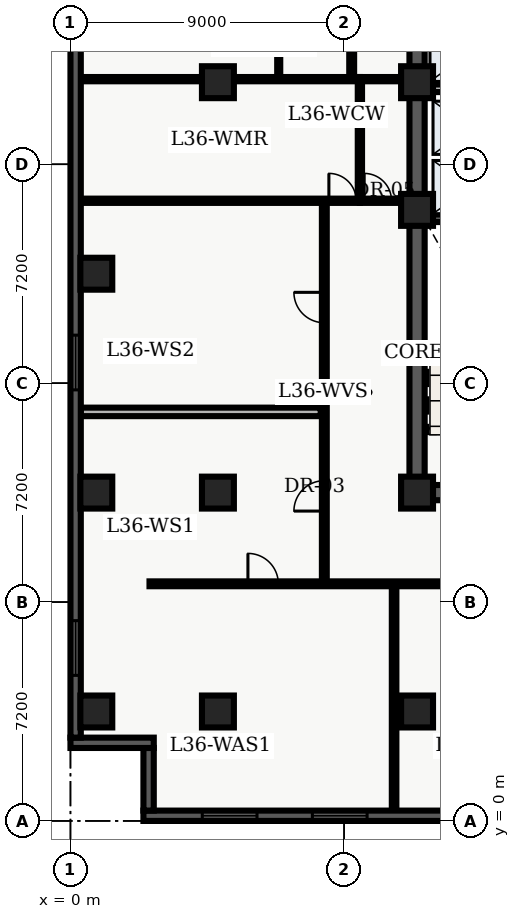
"""IFC4 building model, lengths in metres.
Left out: names, types, materials, properties, quantities, classifications, styles, units other than length and angle.
Written with IfcOpenShell. Run it as: python <this file> out.ifc"""

import sys

from ifc_helpers import new_model, entity, si_unit, converted_unit, direction, frame, origin_with_axes, origin_2d_with_axis, place, context, subcontext, project, spatial, polyline, rectangle, outline, extrude, element, fill, save


model = new_model("IFC4")
c1 = context("Model", 3, precision=1e-05, world=origin_with_axes(), true_north=direction((0.0, 1.0)))
c2 = subcontext(c1, "Body", "Model", "MODEL_VIEW")
j1 = project(units=[si_unit("LENGTHUNIT", "METRE"), converted_unit("PLANEANGLEUNIT", "DEGREE", entity("IfcPlaneAngleMeasure", 0.017), si_unit("PLANEANGLEUNIT", "RADIAN"), dimensions=[0, 0, 0, 0, 0, 0, 0])], contexts=[c1])
p1 = place(None, origin_with_axes())
s1 = spatial("IfcSite", under=j1, at=p1, CompositionType="ELEMENT")
p2 = place(p1, origin_with_axes())
s2 = spatial("IfcBuilding", under=s1, at=p2, CompositionType="ELEMENT")
p3 = place(p2, frame((0.0, 0.0, 148.5), z_axis=(0.0, 0.0, 1.0), x_axis=(1.0, 0.0, 0.0)))
s3 = spatial("IfcBuildingStorey", under=s2, at=p3, CompositionType="ELEMENT", Elevation=148.5)
p4 = place(p3, frame((11.4, 10.8, 0.0), z_axis=(0.0, 0.0, 1.0), x_axis=(0.0, 1.0, 0.0)))
e1 = element("IfcWall", 1, at=p4, inside=s3, PredefinedType="SHEAR", context=c2, shape_type="SweptSolid", body=[
    extrude(outline(polyline([(0.0, -0.25), (27.0, -0.25), (27.0, 0.25), (0.0, 0.25), (0.0, -0.25)])), origin_with_axes(), (0.0, 0.0, 1.0), 3.66),
])
p5 = place(p3, frame((11.4, 10.8, 0.0), z_axis=(0.0, 0.0, 1.0), x_axis=(1.0, 0.0, 0.0)))
e2 = element("IfcWall", 2, at=p5, inside=s3, PredefinedType="SHEAR", context=c2, shape_type="SweptSolid", body=[
    extrude(outline(polyline([(0.0, -0.25), (7.2, -0.25), (7.2, 0.25), (0.0, 0.25), (0.0, -0.25)])), origin_with_axes(), (0.0, 0.0, 1.0), 3.66),
])
p6 = place(p5, frame((2.625, 0.0, 0.0), z_axis=(0.0, 0.0, 1.0), x_axis=(1.0, 0.0, 0.0)))
e3 = element("IfcOpeningElement", 3, at=p6, cuts=e2, PredefinedType="OPENING", context=c2, shape_type="SweptSolid", body=[
    extrude(rectangle(XDim=1.05, YDim=0.52, at=origin_2d_with_axis()), origin_with_axes(), (0.0, 0.0, 1.0), 2.15),
])
p7 = place(p3, frame((11.65, 19.825, 0.0), z_axis=(0.0, 0.0, 1.0), x_axis=(1.0, 0.0, 0.0)))
e4 = element("IfcWall", 4, at=p7, inside=s3, PredefinedType="SHEAR", context=c2, shape_type="SweptSolid", body=[
    extrude(outline(polyline([(0.0, -0.125), (6.7, -0.125), (6.7, 0.125), (0.0, 0.125), (0.0, -0.125)])), origin_with_axes(), (0.0, 0.0, 1.0), 3.66),
])
p8 = place(p3, frame((11.7, 24.1, 0.0), z_axis=(0.0, 0.0, 1.0), x_axis=(1.0, 0.0, 0.0)))
e5 = element("IfcWall", 5, at=p8, inside=s3, PredefinedType="SOLIDWALL", context=c2, shape_type="SweptSolid", body=[
    extrude(outline(polyline([(0.0, -0.125), (6.6, -0.125), (6.6, 0.125), (0.0, 0.125), (0.0, -0.125)])), origin_with_axes(), (0.0, 0.0, 1.0), 2.7),
])
p9 = place(p8, frame((3.75, 0.0, 0.0), z_axis=(0.0, 0.0, 1.0), x_axis=(1.0, 0.0, 0.0)))
e6 = element("IfcOpeningElement", 6, at=p9, cuts=e5, PredefinedType="OPENING", context=c2, shape_type="SweptSolid", body=[
    extrude(rectangle(XDim=0.9, YDim=0.27, at=origin_2d_with_axis()), origin_with_axes(), (0.0, 0.0, 1.0), 2.15),
])
for number, where, z_axis, x_axis in (
    (7, (11.4, 3.6, 0.0), (0.0, 0.0, 1.0), (1.0, 0.0, 0.0)),
    (8, (11.4, 10.8, 0.0), (0.0, 0.0, 1.0), (1.0, 0.0, 0.0)),
    (9, (11.4, 20.1, 0.0), (0.0, 0.0, 1.0), (1.0, 0.0, 0.0)),
    (10, (11.4, 24.3, 0.0), (0.0, 0.0, 1.0), (1.0, 0.0, 0.0)),
    (11, (4.85, 3.6, 0.0), (0.0, 0.0, 1.0), (1.0, 0.0, 0.0)),
    (12, (4.85, 10.8, 0.0), (0.0, 0.0, 1.0), (1.0, 0.0, 0.0)),
    (13, (4.85, 24.3, 0.0), (0.0, 0.0, 1.0), (1.0, 0.0, 0.0)),
    (14, (0.85, 3.6, 0.0), (0.0, 0.0, 1.0), (1.0, 0.0, 0.0)),
    (15, (0.85, 10.8, 0.0), (0.0, 0.0, 1.0), (1.0, 0.0, 0.0)),
    (16, (0.85, 18.0, 0.0), (0.0, 0.0, 1.0), (1.0, 0.0, 0.0)),
):
    element("IfcColumn", number, at=place(p3, frame(where, z_axis=z_axis, x_axis=x_axis)), inside=s3, PredefinedType="COLUMN", context=c2, shape_type="SweptSolid", body=[
        extrude(rectangle(XDim=1.05, YDim=1.05, at=origin_2d_with_axis()), origin_with_axes(), (0.0, 0.0, 1.0), 3.9),
    ])
p10 = place(p3, frame((9.52, 20.4, 0.0), z_axis=(0.0, 0.0, 1.0), x_axis=(0.0, 1.0, 0.0)))
e17 = element("IfcWall", 17, at=p10, inside=s3, PredefinedType="PARTITIONING", context=c2, shape_type="SweptSolid", body=[
    extrude(outline(polyline([(0.0, -0.07), (4.0, -0.07), (4.0, 0.07), (0.0, 0.07), (0.0, -0.07)])), origin_with_axes(), (0.0, 0.0, 1.0), 2.7),
])
p11 = place(p3, frame((9.52, 20.4, 0.0), z_axis=(0.0, 0.0, 1.0), x_axis=(1.0, 0.0, 0.0)))
e18 = element("IfcWall", 18, at=p11, inside=s3, PredefinedType="PARTITIONING", context=c2, shape_type="SweptSolid", body=[
    extrude(outline(polyline([(0.0, -0.07), (1.58, -0.07), (1.58, 0.07), (0.0, 0.07), (0.0, -0.07)])), origin_with_axes(), (0.0, 0.0, 1.0), 2.7),
])
p12 = place(p11, frame((0.59, 0.0, 0.0), z_axis=(0.0, 0.0, 1.0), x_axis=(1.0, 0.0, 0.0)))
e19 = element("IfcOpeningElement", 19, at=p12, cuts=e18, PredefinedType="OPENING", context=c2, shape_type="SweptSolid", body=[
    extrude(rectangle(XDim=0.9, YDim=0.16, at=origin_2d_with_axis()), origin_with_axes(), (0.0, 0.0, 1.0), 2.15),
])
p13 = place(p3, frame((9.52, 24.4, 0.0), z_axis=(0.0, 0.0, 1.0), x_axis=(1.0, 0.0, 0.0)))
e20 = element("IfcWall", 20, at=p13, inside=s3, PredefinedType="PARTITIONING", context=c2, shape_type="SweptSolid", body=[
    extrude(outline(polyline([(0.0, -0.07), (1.58, -0.07), (1.58, 0.07), (0.0, 0.07), (0.0, -0.07)])), origin_with_axes(), (0.0, 0.0, 1.0), 2.7),
])
p14 = place(p3, frame((2.6, 7.8, 0.0), z_axis=(0.0, 0.0, 1.0), x_axis=(1.0, 0.0, 0.0)))
e21 = element("IfcWall", 21, at=p14, inside=s3, PredefinedType="PARTITIONING", context=c2, shape_type="SweptSolid", body=[
    extrude(outline(polyline([(0.0, -0.08), (18.55, -0.08), (18.55, 0.08), (0.0, 0.08), (0.0, -0.08)])), origin_with_axes(), (0.0, 0.0, 1.0), 2.7),
])
p15 = place(p14, frame((3.737, 0.0, 0.0), z_axis=(0.0, 0.0, 1.0), x_axis=(1.0, 0.0, 0.0)))
e22 = element("IfcOpeningElement", 22, at=p15, cuts=e21, PredefinedType="OPENING", context=c2, shape_type="SweptSolid", body=[
    extrude(rectangle(XDim=1.0, YDim=0.18, at=origin_2d_with_axis()), origin_with_axes(), (0.0, 0.0, 1.0), 2.15),
])
p16 = place(p14, frame((13.273, 0.0, 0.0), z_axis=(0.0, 0.0, 1.0), x_axis=(1.0, 0.0, 0.0)))
e23 = element("IfcOpeningElement", 23, at=p16, cuts=e21, PredefinedType="OPENING", context=c2, shape_type="SweptSolid", body=[
    extrude(rectangle(XDim=1.0, YDim=0.18, at=origin_2d_with_axis()), origin_with_axes(), (0.0, 0.0, 1.0), 2.15),
])
p17 = place(p3, frame((8.35, 7.8, 0.0), z_axis=(0.0, 0.0, 1.0), x_axis=(0.0, 1.0, 0.0)))
e24 = element("IfcWall", 24, at=p17, inside=s3, PredefinedType="PARTITIONING", context=c2, shape_type="SweptSolid", body=[
    extrude(outline(polyline([(0.0, -0.08), (12.6, -0.08), (12.6, 0.08), (0.0, 0.08), (0.0, -0.08)])), origin_with_axes(), (0.0, 0.0, 1.0), 2.7),
])
p18 = place(p17, frame((2.893, 0.0, 0.0), z_axis=(0.0, 0.0, 1.0), x_axis=(1.0, 0.0, 0.0)))
e25 = element("IfcOpeningElement", 25, at=p18, cuts=e24, PredefinedType="OPENING", context=c2, shape_type="SweptSolid", body=[
    extrude(rectangle(XDim=1.0, YDim=0.18, at=origin_2d_with_axis()), origin_with_axes(), (0.0, 0.0, 1.0), 2.15),
])
p19 = place(p17, frame((9.088, 0.0, 0.0), z_axis=(0.0, 0.0, 1.0), x_axis=(1.0, 0.0, 0.0)))
e26 = element("IfcOpeningElement", 26, at=p19, cuts=e24, PredefinedType="OPENING", context=c2, shape_type="SweptSolid", body=[
    extrude(rectangle(XDim=1.0, YDim=0.18, at=origin_2d_with_axis()), origin_with_axes(), (0.0, 0.0, 1.0), 2.15),
])
p20 = place(p3, frame((9.25, 24.4, 0.0), z_axis=(0.0, 0.0, 1.0), x_axis=(0.0, 1.0, 0.0)))
e27 = element("IfcWall", 27, at=p20, inside=s3, PredefinedType="PARTITIONING", context=c2, shape_type="SweptSolid", body=[
    extrude(outline(polyline([(0.0, -0.08), (16.1, -0.08), (16.1, 0.08), (0.0, 0.08), (0.0, -0.08)])), origin_with_axes(), (0.0, 0.0, 1.0), 2.7),
])
p21 = place(p20, frame((3.567, 0.0, 0.0), z_axis=(0.0, 0.0, 1.0), x_axis=(1.0, 0.0, 0.0)))
e28 = element("IfcOpeningElement", 28, at=p21, cuts=e27, PredefinedType="OPENING", context=c2, shape_type="SweptSolid", body=[
    extrude(rectangle(XDim=1.0, YDim=0.18, at=origin_2d_with_axis()), origin_with_axes(), (0.0, 0.0, 1.0), 2.15),
])
p22 = place(p20, frame((11.512, 0.0, 0.0), z_axis=(0.0, 0.0, 1.0), x_axis=(1.0, 0.0, 0.0)))
e29 = element("IfcOpeningElement", 29, at=p22, cuts=e27, PredefinedType="OPENING", context=c2, shape_type="SweptSolid", body=[
    extrude(rectangle(XDim=1.0, YDim=0.18, at=origin_2d_with_axis()), origin_with_axes(), (0.0, 0.0, 1.0), 2.15),
])
p23 = place(p3, frame((0.335, 20.4, 0.0), z_axis=(0.0, 0.0, 1.0), x_axis=(1.0, 0.0, 0.0)))
e30 = element("IfcWall", 30, at=p23, inside=s3, PredefinedType="PARTITIONING", context=c2, shape_type="SweptSolid", body=[
    extrude(outline(polyline([(0.0, -0.07), (9.185, -0.07), (9.185, 0.07), (0.0, 0.07), (0.0, -0.07)])), origin_with_axes(), (0.0, 0.0, 1.0), 2.7),
])
p24 = place(p23, frame((8.615, 0.0, 0.0), z_axis=(0.0, 0.0, 1.0), x_axis=(1.0, 0.0, 0.0)))
e31 = element("IfcOpeningElement", 31, at=p24, cuts=e30, PredefinedType="OPENING", context=c2, shape_type="SweptSolid", body=[
    extrude(rectangle(XDim=0.9, YDim=0.16, at=origin_2d_with_axis()), origin_with_axes(), (0.0, 0.0, 1.0), 2.15),
])
p25 = place(p3, frame((0.335, 24.4, 0.0), z_axis=(0.0, 0.0, 1.0), x_axis=(1.0, 0.0, 0.0)))
e32 = element("IfcWall", 32, at=p25, inside=s3, PredefinedType="PARTITIONING", context=c2, shape_type="SweptSolid", body=[
    extrude(outline(polyline([(0.0, -0.07), (9.185, -0.07), (9.185, 0.07), (0.0, 0.07), (0.0, -0.07)])), origin_with_axes(), (0.0, 0.0, 1.0), 2.7),
])
p26 = place(p3, frame((0.335, 13.455, 0.0), z_axis=(0.0, 0.0, 1.0), x_axis=(1.0, 0.0, 0.0)))
e33 = element("IfcWall", 33, at=p26, inside=s3, PredefinedType="PARTITIONING", context=c2, shape_type="SweptSolid", body=[
    extrude(outline(polyline([(0.0, -0.14), (7.895, -0.14), (7.895, 0.14), (0.0, 0.14), (0.0, -0.14)])), origin_with_axes(), (0.0, 0.0, 1.0), 2.7),
])
p27 = place(p3, frame((6.85, 24.55, 0.0), z_axis=(0.0, 0.0, 1.0), x_axis=(0.0, 1.0, 0.0)))
e34 = element("IfcWall", 34, at=p27, inside=s3, PredefinedType="PARTITIONING", context=c2, shape_type="SweptSolid", body=[
    extrude(outline(polyline([(0.0, -0.05), (15.75, -0.05), (15.75, 0.05), (0.0, 0.05), (0.0, -0.05)])), origin_with_axes(), (0.0, 0.0, 1.0), 2.7),
])
p28 = place(p27, frame((3.417, 0.0, 0.0), z_axis=(0.0, 0.0, 1.0), x_axis=(1.0, 0.0, 0.0)))
e35 = element("IfcOpeningElement", 35, at=p28, cuts=e34, PredefinedType="OPENING", context=c2, shape_type="SweptSolid", body=[
    extrude(rectangle(XDim=0.95, YDim=0.12, at=origin_2d_with_axis()), origin_with_axes(), (0.0, 0.0, 1.0), 2.15),
])
p29 = place(p27, frame((11.082, 0.0, 0.0), z_axis=(0.0, 0.0, 1.0), x_axis=(1.0, 0.0, 0.0)))
e36 = element("IfcOpeningElement", 36, at=p29, cuts=e34, PredefinedType="OPENING", context=c2, shape_type="SweptSolid", body=[
    extrude(rectangle(XDim=0.95, YDim=0.12, at=origin_2d_with_axis()), origin_with_axes(), (0.0, 0.0, 1.0), 2.15),
])
p30 = place(p3, frame((10.645, 0.335, 0.0), z_axis=(0.0, 0.0, 1.0), x_axis=(0.0, 1.0, 0.0)))
e37 = element("IfcWall", 37, at=p30, inside=s3, PredefinedType="PARTITIONING", context=c2, shape_type="SweptSolid", body=[
    extrude(outline(polyline([(0.0, -0.075), (7.365, -0.075), (7.365, 0.075), (0.0, 0.075), (0.0, -0.075)])), origin_with_axes(), (0.0, 0.0, 1.0), 2.7),
])
p31 = place(p3, frame((57.26, 0.17, 0.0), z_axis=(0.0, 0.0, 1.0), x_axis=(-1.0, 0.0, 0.0)))
e38 = element("IfcWall", 38, at=p31, inside=s3, PredefinedType="SOLIDWALL", context=c2, shape_type="SweptSolid", body=[
    extrude(outline(polyline([(0.0, -0.17), (54.86, -0.17), (54.86, 0.17), (0.0, 0.17), (0.0, -0.17)])), origin_with_axes(), (0.0, 0.0, 1.0), 3.66),
])
p32 = place(p31, frame((2.836, 0.0, 0.45), z_axis=(0.0, 0.0, 1.0), x_axis=(1.0, 0.0, 0.0)))
e39 = element("IfcOpeningElement", 39, at=p32, cuts=e38, PredefinedType="OPENING", context=c2, shape_type="SweptSolid", body=[
    extrude(rectangle(XDim=1.8, YDim=0.36, at=origin_2d_with_axis()), origin_with_axes(), (0.0, 0.0, 1.0), 2.1),
])
p33 = place(p31, frame((7.307, 0.0, 0.45), z_axis=(0.0, 0.0, 1.0), x_axis=(1.0, 0.0, 0.0)))
e40 = element("IfcOpeningElement", 40, at=p33, cuts=e38, PredefinedType="OPENING", context=c2, shape_type="SweptSolid", body=[
    extrude(rectangle(XDim=1.8, YDim=0.36, at=origin_2d_with_axis()), origin_with_axes(), (0.0, 0.0, 1.0), 2.1),
])
p34 = place(p31, frame((11.779, 0.0, 0.45), z_axis=(0.0, 0.0, 1.0), x_axis=(1.0, 0.0, 0.0)))
e41 = element("IfcOpeningElement", 41, at=p34, cuts=e38, PredefinedType="OPENING", context=c2, shape_type="SweptSolid", body=[
    extrude(rectangle(XDim=1.8, YDim=0.36, at=origin_2d_with_axis()), origin_with_axes(), (0.0, 0.0, 1.0), 2.1),
])
p35 = place(p31, frame((16.251, 0.0, 0.45), z_axis=(0.0, 0.0, 1.0), x_axis=(1.0, 0.0, 0.0)))
e42 = element("IfcOpeningElement", 42, at=p35, cuts=e38, PredefinedType="OPENING", context=c2, shape_type="SweptSolid", body=[
    extrude(rectangle(XDim=1.8, YDim=0.36, at=origin_2d_with_axis()), origin_with_axes(), (0.0, 0.0, 1.0), 2.1),
])
p36 = place(p31, frame((20.723, 0.0, 0.45), z_axis=(0.0, 0.0, 1.0), x_axis=(1.0, 0.0, 0.0)))
e43 = element("IfcOpeningElement", 43, at=p36, cuts=e38, PredefinedType="OPENING", context=c2, shape_type="SweptSolid", body=[
    extrude(rectangle(XDim=1.8, YDim=0.36, at=origin_2d_with_axis()), origin_with_axes(), (0.0, 0.0, 1.0), 2.1),
])
p37 = place(p31, frame((25.194, 0.0, 0.45), z_axis=(0.0, 0.0, 1.0), x_axis=(1.0, 0.0, 0.0)))
e44 = element("IfcOpeningElement", 44, at=p37, cuts=e38, PredefinedType="OPENING", context=c2, shape_type="SweptSolid", body=[
    extrude(rectangle(XDim=1.8, YDim=0.36, at=origin_2d_with_axis()), origin_with_axes(), (0.0, 0.0, 1.0), 2.1),
])
p38 = place(p31, frame((29.666, 0.0, 0.45), z_axis=(0.0, 0.0, 1.0), x_axis=(1.0, 0.0, 0.0)))
e45 = element("IfcOpeningElement", 45, at=p38, cuts=e38, PredefinedType="OPENING", context=c2, shape_type="SweptSolid", body=[
    extrude(rectangle(XDim=1.8, YDim=0.36, at=origin_2d_with_axis()), origin_with_axes(), (0.0, 0.0, 1.0), 2.1),
])
p39 = place(p31, frame((34.138, 0.0, 0.45), z_axis=(0.0, 0.0, 1.0), x_axis=(1.0, 0.0, 0.0)))
e46 = element("IfcOpeningElement", 46, at=p39, cuts=e38, PredefinedType="OPENING", context=c2, shape_type="SweptSolid", body=[
    extrude(rectangle(XDim=1.8, YDim=0.36, at=origin_2d_with_axis()), origin_with_axes(), (0.0, 0.0, 1.0), 2.1),
])
p40 = place(p31, frame((38.609, 0.0, 0.45), z_axis=(0.0, 0.0, 1.0), x_axis=(1.0, 0.0, 0.0)))
e47 = element("IfcOpeningElement", 47, at=p40, cuts=e38, PredefinedType="OPENING", context=c2, shape_type="SweptSolid", body=[
    extrude(rectangle(XDim=1.8, YDim=0.36, at=origin_2d_with_axis()), origin_with_axes(), (0.0, 0.0, 1.0), 2.1),
])
p41 = place(p31, frame((43.081, 0.0, 0.45), z_axis=(0.0, 0.0, 1.0), x_axis=(1.0, 0.0, 0.0)))
e48 = element("IfcOpeningElement", 48, at=p41, cuts=e38, PredefinedType="OPENING", context=c2, shape_type="SweptSolid", body=[
    extrude(rectangle(XDim=1.8, YDim=0.36, at=origin_2d_with_axis()), origin_with_axes(), (0.0, 0.0, 1.0), 2.1),
])
p42 = place(p31, frame((48.403, 0.0, 0.45), z_axis=(0.0, 0.0, 1.0), x_axis=(1.0, 0.0, 0.0)))
e49 = element("IfcOpeningElement", 49, at=p42, cuts=e38, PredefinedType="OPENING", context=c2, shape_type="SweptSolid", body=[
    extrude(rectangle(XDim=1.8, YDim=0.36, at=origin_2d_with_axis()), origin_with_axes(), (0.0, 0.0, 1.0), 2.1),
])
p43 = place(p31, frame((52.024, 0.0, 0.45), z_axis=(0.0, 0.0, 1.0), x_axis=(1.0, 0.0, 0.0)))
e50 = element("IfcOpeningElement", 50, at=p43, cuts=e38, PredefinedType="OPENING", context=c2, shape_type="SweptSolid", body=[
    extrude(rectangle(XDim=1.8, YDim=0.36, at=origin_2d_with_axis()), origin_with_axes(), (0.0, 0.0, 1.0), 2.1),
])
p44 = place(p3, frame((2.57, 0.34, 0.0), z_axis=(0.0, 0.0, 1.0), x_axis=(0.0, 1.0, 0.0)))
e51 = element("IfcWall", 51, at=p44, inside=s3, PredefinedType="SOLIDWALL", context=c2, shape_type="SweptSolid", body=[
    extrude(outline(polyline([(0.0, -0.17), (2.06, -0.17), (2.06, 0.17), (0.0, 0.17), (0.0, -0.17)])), origin_with_axes(), (0.0, 0.0, 1.0), 3.66),
])
p45 = place(p3, frame((2.74, 2.57, 0.0), z_axis=(0.0, 0.0, 1.0), x_axis=(-1.0, 0.0, 0.0)))
e52 = element("IfcWall", 52, at=p45, inside=s3, PredefinedType="SOLIDWALL", context=c2, shape_type="SweptSolid", body=[
    extrude(outline(polyline([(0.0, -0.17), (2.74, -0.17), (2.74, 0.17), (0.0, 0.17), (0.0, -0.17)])), origin_with_axes(), (0.0, 0.0, 1.0), 3.66),
])
p46 = place(p3, frame((0.17, 2.74, 0.0), z_axis=(0.0, 0.0, 1.0), x_axis=(0.0, 1.0, 0.0)))
e53 = element("IfcWall", 53, at=p46, inside=s3, PredefinedType="SOLIDWALL", context=c2, shape_type="SweptSolid", body=[
    extrude(outline(polyline([(0.0, -0.17), (43.46, -0.17), (43.46, 0.17), (0.0, 0.17), (0.0, -0.17)])), origin_with_axes(), (0.0, 0.0, 1.0), 3.66),
])
p47 = place(p46, frame((2.948, 0.0, 0.45), z_axis=(0.0, 0.0, 1.0), x_axis=(1.0, 0.0, 0.0)))
e54 = element("IfcOpeningElement", 54, at=p47, cuts=e53, PredefinedType="OPENING", context=c2, shape_type="SweptSolid", body=[
    extrude(rectangle(XDim=1.8, YDim=0.36, at=origin_2d_with_axis()), origin_with_axes(), (0.0, 0.0, 1.0), 2.1),
])
p48 = place(p46, frame((12.339, 0.0, 0.45), z_axis=(0.0, 0.0, 1.0), x_axis=(1.0, 0.0, 0.0)))
e55 = element("IfcOpeningElement", 55, at=p48, cuts=e53, PredefinedType="OPENING", context=c2, shape_type="SweptSolid", body=[
    extrude(rectangle(XDim=1.8, YDim=0.36, at=origin_2d_with_axis()), origin_with_axes(), (0.0, 0.0, 1.0), 2.1),
])
p49 = place(p46, frame((26.426, 0.0, 0.45), z_axis=(0.0, 0.0, 1.0), x_axis=(1.0, 0.0, 0.0)))
e56 = element("IfcOpeningElement", 56, at=p49, cuts=e53, PredefinedType="OPENING", context=c2, shape_type="SweptSolid", body=[
    extrude(rectangle(XDim=1.8, YDim=0.36, at=origin_2d_with_axis()), origin_with_axes(), (0.0, 0.0, 1.0), 2.1),
])
p50 = place(p46, frame((31.121, 0.0, 0.45), z_axis=(0.0, 0.0, 1.0), x_axis=(1.0, 0.0, 0.0)))
e57 = element("IfcOpeningElement", 57, at=p50, cuts=e53, PredefinedType="OPENING", context=c2, shape_type="SweptSolid", body=[
    extrude(rectangle(XDim=1.8, YDim=0.36, at=origin_2d_with_axis()), origin_with_axes(), (0.0, 0.0, 1.0), 2.1),
])
p51 = place(p46, frame((40.062, 0.0, 0.45), z_axis=(0.0, 0.0, 1.0), x_axis=(1.0, 0.0, 0.0)))
e58 = element("IfcOpeningElement", 58, at=p51, cuts=e53, PredefinedType="OPENING", context=c2, shape_type="SweptSolid", body=[
    extrude(rectangle(XDim=1.8, YDim=0.36, at=origin_2d_with_axis()), origin_with_axes(), (0.0, 0.0, 1.0), 2.1),
])
p52 = place(p11, frame((0.59, 0.0, 0.0), z_axis=(0.0, 0.0, 1.0), x_axis=(1.0, 0.0, 0.0)))
e59 = element("IfcDoor", 59, at=p52, inside=s3, OperationType="SINGLE_SWING_LEFT", PredefinedType="DOOR", context=c2, shape_type="SweptSolid", body=[
    extrude(rectangle(XDim=0.9, YDim=0.084, at=origin_2d_with_axis()), origin_with_axes(), (0.0, 0.0, 1.0), 2.15),
])
fill(e19, e59)
p53 = place(p23, frame((8.615, 0.0, 0.0), z_axis=(0.0, 0.0, 1.0), x_axis=(1.0, 0.0, 0.0)))
e60 = element("IfcDoor", 60, at=p53, inside=s3, OperationType="SINGLE_SWING_LEFT", PredefinedType="DOOR", context=c2, shape_type="SweptSolid", body=[
    extrude(rectangle(XDim=0.9, YDim=0.084, at=origin_2d_with_axis()), origin_with_axes(), (0.0, 0.0, 1.0), 2.15),
])
fill(e31, e60)
p54 = place(p17, frame((2.893, 0.0, 0.0), z_axis=(0.0, 0.0, 1.0), x_axis=(1.0, 0.0, 0.0)))
e61 = element("IfcDoor", 61, at=p54, inside=s3, OperationType="SINGLE_SWING_LEFT", PredefinedType="DOOR", context=c2, shape_type="SweptSolid", body=[
    extrude(rectangle(XDim=1.0, YDim=0.09, at=origin_2d_with_axis()), origin_with_axes(), (0.0, 0.0, 1.0), 2.15),
])
fill(e25, e61)
p55 = place(p17, frame((9.088, 0.0, 0.0), z_axis=(0.0, 0.0, 1.0), x_axis=(1.0, 0.0, 0.0)))
e62 = element("IfcDoor", 62, at=p55, inside=s3, OperationType="SINGLE_SWING_RIGHT", PredefinedType="DOOR", context=c2, shape_type="SweptSolid", body=[
    extrude(rectangle(XDim=1.0, YDim=0.09, at=origin_2d_with_axis()), origin_with_axes(), (0.0, 0.0, 1.0), 2.15),
])
fill(e26, e62)
p56 = place(p14, frame((3.737, 0.0, 0.0), z_axis=(0.0, 0.0, 1.0), x_axis=(1.0, 0.0, 0.0)))
e63 = element("IfcDoor", 63, at=p56, inside=s3, OperationType="SINGLE_SWING_LEFT", PredefinedType="DOOR", context=c2, shape_type="SweptSolid", body=[
    extrude(rectangle(XDim=1.0, YDim=0.09, at=origin_2d_with_axis()), origin_with_axes(), (0.0, 0.0, 1.0), 2.15),
])
fill(e22, e63)
p57 = place(p31, frame((48.403, 0.0, 0.45), z_axis=(0.0, 0.0, 1.0), x_axis=(1.0, 0.0, 0.0)))
e64 = element("IfcWindow", 64, at=p57, inside=s3, PredefinedType="WINDOW", context=c2, shape_type="SweptSolid", body=[
    extrude(rectangle(XDim=1.8, YDim=0.09, at=origin_2d_with_axis()), origin_with_axes(), (0.0, 0.0, 1.0), 2.1),
])
fill(e49, e64)
p58 = place(p31, frame((52.024, 0.0, 0.45), z_axis=(0.0, 0.0, 1.0), x_axis=(1.0, 0.0, 0.0)))
e65 = element("IfcWindow", 65, at=p58, inside=s3, PredefinedType="WINDOW", context=c2, shape_type="SweptSolid", body=[
    extrude(rectangle(XDim=1.8, YDim=0.09, at=origin_2d_with_axis()), origin_with_axes(), (0.0, 0.0, 1.0), 2.1),
])
fill(e50, e65)
p59 = place(p46, frame((2.948, 0.0, 0.45), z_axis=(0.0, 0.0, 1.0), x_axis=(1.0, 0.0, 0.0)))
e66 = element("IfcWindow", 66, at=p59, inside=s3, PredefinedType="WINDOW", context=c2, shape_type="SweptSolid", body=[
    extrude(rectangle(XDim=1.8, YDim=0.09, at=origin_2d_with_axis()), origin_with_axes(), (0.0, 0.0, 1.0), 2.1),
])
fill(e54, e66)
p60 = place(p46, frame((12.339, 0.0, 0.45), z_axis=(0.0, 0.0, 1.0), x_axis=(1.0, 0.0, 0.0)))
e67 = element("IfcWindow", 67, at=p60, inside=s3, PredefinedType="WINDOW", context=c2, shape_type="SweptSolid", body=[
    extrude(rectangle(XDim=1.8, YDim=0.09, at=origin_2d_with_axis()), origin_with_axes(), (0.0, 0.0, 1.0), 2.1),
])
fill(e55, e67)
save(model, sys.argv[1])
